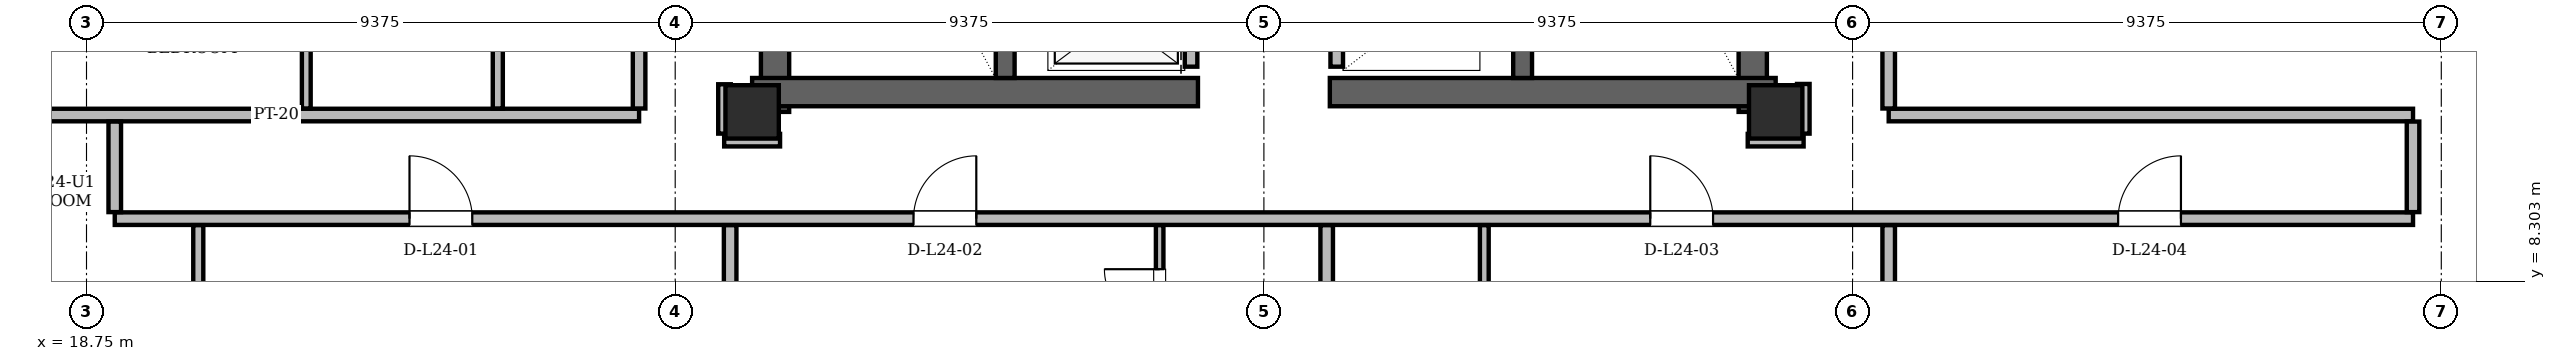
"""IFC4 building model, lengths in metres.
Left out: names, types, materials, properties, quantities, classifications, styles, units other than length and angle.
Written with IfcOpenShell. Run it as: python <this file> out.ifc"""

import sys

from ifc_helpers import new_model, si_unit, direction, frame, frame_2d, origin, origin_2d, place, context, subcontext, project, spatial, rectangle, hollow_rectangle, extrude, element, fill, save


model = new_model("IFC4")
c1 = context("Model", 3, precision=1e-05, world=origin(), true_north=direction((0.0, 1.0)))
c2 = subcontext(c1, "Body", "Model", "MODEL_VIEW")
j1 = project(units=[si_unit("LENGTHUNIT", "METRE"), si_unit("PLANEANGLEUNIT", "RADIAN")], contexts=[c1])
p1 = place(None, origin())
s1 = spatial("IfcSite", under=j1, at=p1, CompositionType="ELEMENT")
p2 = place(p1, origin())
s2 = spatial("IfcBuilding", under=s1, at=p2, CompositionType="ELEMENT")
p3 = place(p2, frame((0.0, 0.0, 93.3)))
s3 = spatial("IfcBuildingStorey", under=s2, at=p3, CompositionType="ELEMENT", Elevation=93.3)
for number, where, z_axis, x_axis in (
    (1, (29.35, 11.0, 0.0), (0.0, 0.0, 1.0), (1.0, 0.0, 0.0)),
    (2, (45.65, 11.0, 0.0), (0.0, 0.0, 1.0), (1.0, 0.0, 0.0)),
):
    element("IfcColumn", number, at=place(p3, frame(where, z_axis=z_axis, x_axis=x_axis)), inside=s3, PredefinedType="COLUMN", context=c2, shape_type="SweptSolid", body=[
        extrude(hollow_rectangle(XDim=0.85, YDim=0.85, WallThickness=0.07, at=origin_2d()), origin(), (0.0, 0.0, 1.0), 3.6),
    ])
for number, where, z_axis, x_axis in (
    (3, (29.715, 11.0, 0.0), (0.0, 0.0, 1.0), (0.0, 1.0, 0.0)),
    (4, (45.285, 11.0, 0.0), (0.0, 0.0, 1.0), (0.0, 1.0, 0.0)),
):
    element("IfcWall", number, at=place(p3, frame(where, z_axis=z_axis, x_axis=x_axis)), inside=s3, PredefinedType="SHEAR", context=c2, shape_type="SweptSolid", body=[
        extrude(rectangle(XDim=13.3, YDim=0.45, at=frame_2d((6.65, 0.0))), origin(), (0.0, 0.0, 1.0), 3.36),
    ])
for number, where, z_axis, x_axis in (
    (5, (29.35, 11.315, 0.0), (0.0, 0.0, 1.0), (1.0, 0.0, 0.0)),
    (6, (38.55, 11.315, 0.0), (0.0, 0.0, 1.0), (1.0, 0.0, 0.0)),
):
    element("IfcWall", number, at=place(p3, frame(where, z_axis=z_axis, x_axis=x_axis)), inside=s3, PredefinedType="SHEAR", context=c2, shape_type="SweptSolid", body=[
        extrude(rectangle(XDim=7.1, YDim=0.45, at=frame_2d((3.55, 0.0))), origin(), (0.0, 0.0, 1.0), 3.36),
    ])
for number, where, z_axis, x_axis in (
    (7, (33.38, 11.54, 0.0), (0.0, 0.0, 1.0), (0.0, 1.0, 0.0)),
    (8, (41.62, 11.54, 0.0), (0.0, 0.0, 1.0), (0.0, 1.0, 0.0)),
):
    element("IfcWall", number, at=place(p3, frame(where, z_axis=z_axis, x_axis=x_axis)), inside=s3, PredefinedType="SHEAR", context=c2, shape_type="SweptSolid", body=[
        extrude(rectangle(XDim=7.62, YDim=0.3, at=frame_2d((3.81, 0.0))), origin(), (0.0, 0.0, 1.0), 3.36),
    ])
p4 = place(p3, frame((14.197, 13.718, 0.0), z_axis=(0.0, 0.0, 1.0), x_axis=(0.500008273126, -0.86602062724, 0.0)))
e9 = element("IfcWall", 9, at=p4, inside=s3, PredefinedType="SOLIDWALL", context=c2, shape_type="SweptSolid", body=[
    extrude(rectangle(XDim=12.249, YDim=0.34, at=frame_2d((6.125, 0.0))), origin(), (0.0, 0.0, 1.0), 2.578),
])
p5 = place(p4, frame((0.852, 0.0, 1.28)))
e10 = element("IfcOpeningElement", 10, at=p5, cuts=e9, PredefinedType="OPENING", context=c2, shape_type="SweptSolid", body=[
    extrude(rectangle(XDim=0.85, YDim=0.92, at=frame_2d((0.425, 0.46))), frame((0.0, 0.17, 0.0), z_axis=(0.0, -1.0, 0.0), x_axis=(1.0, 0.0, 0.0)), (0.0, 0.0, 1.0), 0.34),
])
p6 = place(p3, frame((54.678, 3.11, 0.0), z_axis=(0.0, 0.0, 1.0), x_axis=(0.500008273126, 0.86602062724, 0.0)))
e11 = element("IfcWall", 11, at=p6, inside=s3, PredefinedType="SOLIDWALL", context=c2, shape_type="SweptSolid", body=[
    extrude(rectangle(XDim=12.249, YDim=0.34, at=frame_2d((6.125, 0.0))), origin(), (0.0, 0.0, 1.0), 2.578),
])
p7 = place(p3, frame((36.34, 11.72, 0.0), z_axis=(0.0, 0.0, 1.0), x_axis=(0.0, 1.0, 0.0)))
e12 = element("IfcWall", 12, at=p7, inside=s3, PredefinedType="PARTITIONING", context=c2, shape_type="SweptSolid", body=[
    extrude(rectangle(XDim=7.6, YDim=0.2, at=frame_2d((3.8, 0.0))), origin(), (0.0, 0.0, 1.0), 3.36),
])
p8 = place(p7, frame((0.255, 0.0, 0.0)))
e13 = element("IfcOpeningElement", 13, at=p8, cuts=e12, PredefinedType="OPENING", context=c2, shape_type="SweptSolid", body=[
    extrude(rectangle(XDim=1.05, YDim=2.15, at=frame_2d((0.525, 1.075))), frame((0.0, 0.1, 0.0), z_axis=(0.0, -1.0, 0.0), x_axis=(1.0, 0.0, 0.0)), (0.0, 0.0, 1.0), 0.2),
])
p9 = place(p7, frame((2.105, 0.0, 0.0)))
e14 = element("IfcOpeningElement", 14, at=p9, cuts=e12, PredefinedType="OPENING", context=c2, shape_type="SweptSolid", body=[
    extrude(rectangle(XDim=1.05, YDim=2.15, at=frame_2d((0.525, 1.075))), frame((0.0, 0.1, 0.0), z_axis=(0.0, -1.0, 0.0), x_axis=(1.0, 0.0, 0.0)), (0.0, 0.0, 1.0), 0.2),
])
p10 = place(p7, frame((3.955, 0.0, 0.0)))
e15 = element("IfcOpeningElement", 15, at=p10, cuts=e12, PredefinedType="OPENING", context=c2, shape_type="SweptSolid", body=[
    extrude(rectangle(XDim=1.05, YDim=2.15, at=frame_2d((0.525, 1.075))), frame((0.0, 0.1, 0.0), z_axis=(0.0, -1.0, 0.0), x_axis=(1.0, 0.0, 0.0)), (0.0, 0.0, 1.0), 0.2),
])
p11 = place(p3, frame((38.66, 11.72, 0.0), z_axis=(0.0, 0.0, 1.0), x_axis=(0.0, 1.0, 0.0)))
e16 = element("IfcWall", 16, at=p11, inside=s3, PredefinedType="PARTITIONING", context=c2, shape_type="SweptSolid", body=[
    extrude(rectangle(XDim=9.1, YDim=0.2, at=frame_2d((4.55, 0.0))), origin(), (0.0, 0.0, 1.0), 3.36),
])
p12 = place(p3, frame((19.2, 9.3, 0.0), z_axis=(0.0, 0.0, 1.0), x_axis=(1.0, 0.0, 0.0)))
e17 = element("IfcWall", 17, at=p12, inside=s3, PredefinedType="PARTITIONING", context=c2, shape_type="SweptSolid", body=[
    extrude(rectangle(XDim=36.6, YDim=0.2, at=frame_2d((18.3, 0.0))), origin(), (0.0, 0.0, 1.0), 2.814),
])
p13 = place(p12, frame((4.694, 0.0, 0.0)))
e18 = element("IfcOpeningElement", 18, at=p13, cuts=e17, PredefinedType="OPENING", context=c2, shape_type="SweptSolid", body=[
    extrude(rectangle(XDim=1.0, YDim=2.18, at=frame_2d((0.5, 1.09))), frame((0.0, 0.1, 0.0), z_axis=(0.0, -1.0, 0.0), x_axis=(1.0, 0.0, 0.0)), (0.0, 0.0, 1.0), 0.2),
])
p14 = place(p12, frame((12.72, 0.0, 0.0)))
e19 = element("IfcOpeningElement", 19, at=p14, cuts=e17, PredefinedType="OPENING", context=c2, shape_type="SweptSolid", body=[
    extrude(rectangle(XDim=1.0, YDim=2.18, at=frame_2d((0.5, 1.09))), frame((0.0, 0.1, 0.0), z_axis=(0.0, -1.0, 0.0), x_axis=(1.0, 0.0, 0.0)), (0.0, 0.0, 1.0), 0.2),
])
p15 = place(p12, frame((24.453, 0.0, 0.0)))
e20 = element("IfcOpeningElement", 20, at=p15, cuts=e17, PredefinedType="OPENING", context=c2, shape_type="SweptSolid", body=[
    extrude(rectangle(XDim=1.0, YDim=2.18, at=frame_2d((0.5, 1.09))), frame((0.0, 0.1, 0.0), z_axis=(0.0, -1.0, 0.0), x_axis=(1.0, 0.0, 0.0)), (0.0, 0.0, 1.0), 0.2),
])
p16 = place(p12, frame((31.904, 0.0, 0.0)))
e21 = element("IfcOpeningElement", 21, at=p16, cuts=e17, PredefinedType="OPENING", context=c2, shape_type="SweptSolid", body=[
    extrude(rectangle(XDim=1.0, YDim=2.18, at=frame_2d((0.5, 1.09))), frame((0.0, 0.1, 0.0), z_axis=(0.0, -1.0, 0.0), x_axis=(1.0, 0.0, 0.0)), (0.0, 0.0, 1.0), 0.2),
])
for number, where, z_axis, x_axis in (
    (22, (28.905, 10.55, 0.0), (0.0, 0.0, 1.0), (1.0, 0.0, 0.0)),
    (23, (45.205, 10.55, 0.0), (0.0, 0.0, 1.0), (1.0, 0.0, 0.0)),
):
    element("IfcWall", number, at=place(p3, frame(where, z_axis=z_axis, x_axis=x_axis)), inside=s3, PredefinedType="PARTITIONING", context=c2, shape_type="SweptSolid", body=[
        extrude(rectangle(XDim=0.89, YDim=0.2, at=frame_2d((0.445, 0.0))), origin(), (0.0, 0.0, 1.0), 3.36),
    ])
p17 = place(p3, frame((15.996, 10.95, 0.0), z_axis=(0.0, 0.0, 1.0), x_axis=(1.0, 0.0, 0.0)))
e24 = element("IfcWall", 24, at=p17, inside=s3, PredefinedType="PARTITIONING", context=c2, shape_type="SweptSolid", body=[
    extrude(rectangle(XDim=11.554, YDim=0.2, at=frame_2d((5.777, 0.0))), origin(), (0.0, 0.0, 1.0), 3.36),
])
p18 = place(p3, frame((47.45, 10.95, 0.0), z_axis=(0.0, 0.0, 1.0), x_axis=(1.0, 0.0, 0.0)))
e25 = element("IfcWall", 25, at=p18, inside=s3, PredefinedType="PARTITIONING", context=c2, shape_type="SweptSolid", body=[
    extrude(rectangle(XDim=8.35, YDim=0.2, at=frame_2d((4.175, 0.0))), origin(), (0.0, 0.0, 1.0), 3.36),
])
p19 = place(p3, frame((19.2, 9.404, 0.0), z_axis=(0.0, 0.0, 1.0), x_axis=(0.0, 1.0, 0.0)))
e26 = element("IfcWall", 26, at=p19, inside=s3, PredefinedType="PARTITIONING", context=c2, shape_type="SweptSolid", body=[
    extrude(rectangle(XDim=1.442, YDim=0.2, at=frame_2d((0.721, 0.0))), origin(), (0.0, 0.0, 1.0), 3.36),
])
p20 = place(p3, frame((20.53, 3.519, 0.0), z_axis=(0.0, 0.0, 1.0), x_axis=(0.0, 1.0, 0.0)))
e27 = element("IfcWall", 27, at=p20, inside=s3, PredefinedType="PARTITIONING", context=c2, shape_type="SweptSolid", body=[
    extrude(rectangle(XDim=5.677, YDim=0.16, at=frame_2d((2.838, 0.0))), origin(), (0.0, 0.0, 1.0), 3.36),
])
p21 = place(p20, frame((2.321, 0.0, 0.0)))
e28 = element("IfcOpeningElement", 28, at=p21, cuts=e27, PredefinedType="OPENING", context=c2, shape_type="SweptSolid", body=[
    extrude(rectangle(XDim=0.88, YDim=2.08, at=frame_2d((0.44, 1.04))), frame((0.0, 0.08, 0.0), z_axis=(0.0, -1.0, 0.0), x_axis=(1.0, 0.0, 0.0)), (0.0, 0.0, 1.0), 0.16),
])
p22 = place(p3, frame((22.25, 11.054, 0.0), z_axis=(0.0, 0.0, 1.0), x_axis=(0.0, 1.0, 0.0)))
e29 = element("IfcWall", 29, at=p22, inside=s3, PredefinedType="PARTITIONING", context=c2, shape_type="SweptSolid", body=[
    extrude(rectangle(XDim=2.482, YDim=0.14, at=frame_2d((1.241, 0.0))), origin(), (0.0, 0.0, 1.0), 2.814),
])
p23 = place(p3, frame((25.3, 11.054, 0.0), z_axis=(0.0, 0.0, 1.0), x_axis=(0.0, 1.0, 0.0)))
e30 = element("IfcWall", 30, at=p23, inside=s3, PredefinedType="PARTITIONING", context=c2, shape_type="SweptSolid", body=[
    extrude(rectangle(XDim=2.482, YDim=0.16, at=frame_2d((1.241, 0.0))), origin(), (0.0, 0.0, 1.0), 2.814),
])
p24 = place(p3, frame((27.55, 11.054, 0.0), z_axis=(0.0, 0.0, 1.0), x_axis=(0.0, 1.0, 0.0)))
e31 = element("IfcWall", 31, at=p24, inside=s3, PredefinedType="PARTITIONING", context=c2, shape_type="SweptSolid", body=[
    extrude(rectangle(XDim=14.812, YDim=0.2, at=frame_2d((7.406, 0.0))), origin(), (0.0, 0.0, 1.0), 2.814),
])
p25 = place(p24, frame((3.825, 0.0, 0.0)))
e32 = element("IfcOpeningElement", 32, at=p25, cuts=e31, PredefinedType="OPENING", context=c2, shape_type="SweptSolid", body=[
    extrude(rectangle(XDim=1.0, YDim=2.18, at=frame_2d((0.5, 1.09))), frame((0.0, 0.1, 0.0), z_axis=(0.0, -1.0, 0.0), x_axis=(1.0, 0.0, 0.0)), (0.0, 0.0, 1.0), 0.2),
])
p26 = place(p24, frame((10.328, 0.0, 0.0)))
e33 = element("IfcOpeningElement", 33, at=p26, cuts=e31, PredefinedType="OPENING", context=c2, shape_type="SweptSolid", body=[
    extrude(rectangle(XDim=1.0, YDim=2.18, at=frame_2d((0.5, 1.09))), frame((0.0, 0.1, 0.0), z_axis=(0.0, -1.0, 0.0), x_axis=(1.0, 0.0, 0.0)), (0.0, 0.0, 1.0), 0.2),
])
p27 = place(p3, frame((28.91, 10.654, 0.0), z_axis=(0.0, 0.0, 1.0), x_axis=(0.0, 1.0, 0.0)))
e34 = element("IfcWall", 34, at=p27, inside=s3, PredefinedType="PARTITIONING", context=c2, shape_type="SweptSolid", body=[
    extrude(rectangle(XDim=0.786, YDim=0.2, at=frame_2d((0.393, 0.0))), origin(), (0.0, 0.0, 1.0), 2.814),
])
p28 = place(p3, frame((29.0, 3.284, 0.0), z_axis=(0.0, 0.0, 1.0), x_axis=(0.0, 1.0, 0.0)))
e35 = element("IfcWall", 35, at=p28, inside=s3, PredefinedType="PARTITIONING", context=c2, shape_type="SweptSolid", body=[
    extrude(rectangle(XDim=5.912, YDim=0.2, at=frame_2d((2.956, 0.0))), origin(), (0.0, 0.0, 1.0), 2.946),
])
p29 = place(p3, frame((35.84, 3.204, 0.0), z_axis=(0.0, 0.0, 1.0), x_axis=(0.0, 1.0, 0.0)))
e36 = element("IfcWall", 36, at=p29, inside=s3, PredefinedType="PARTITIONING", context=c2, shape_type="SweptSolid", body=[
    extrude(rectangle(XDim=5.992, YDim=0.12, at=frame_2d((2.996, 0.0))), origin(), (0.0, 0.0, 1.0), 3.36),
])
p30 = place(p29, frame((1.326, 0.0, 0.0)))
e37 = element("IfcOpeningElement", 37, at=p30, cuts=e36, PredefinedType="OPENING", context=c2, shape_type="SweptSolid", body=[
    extrude(rectangle(XDim=0.95, YDim=2.1, at=frame_2d((0.475, 1.05))), frame((0.0, 0.06, 0.0), z_axis=(0.0, -1.0, 0.0), x_axis=(1.0, 0.0, 0.0)), (0.0, 0.0, 1.0), 0.12),
])
p31 = place(p29, frame((4.411, 0.0, 0.0)))
e38 = element("IfcOpeningElement", 38, at=p31, cuts=e36, PredefinedType="OPENING", context=c2, shape_type="SweptSolid", body=[
    extrude(rectangle(XDim=0.88, YDim=2.08, at=frame_2d((0.44, 1.04))), frame((0.0, 0.06, 0.0), z_axis=(0.0, -1.0, 0.0), x_axis=(1.0, 0.0, 0.0)), (0.0, 0.0, 1.0), 0.12),
])
p32 = place(p3, frame((38.5, 3.204, 0.0), z_axis=(0.0, 0.0, 1.0), x_axis=(0.0, 1.0, 0.0)))
e39 = element("IfcWall", 39, at=p32, inside=s3, PredefinedType="PARTITIONING", context=c2, shape_type="SweptSolid", body=[
    extrude(rectangle(XDim=5.992, YDim=0.2, at=frame_2d((2.996, 0.0))), origin(), (0.0, 0.0, 1.0), 2.578),
])
p33 = place(p3, frame((41.01, 3.284, 0.0), z_axis=(0.0, 0.0, 1.0), x_axis=(0.0, 1.0, 0.0)))
e40 = element("IfcWall", 40, at=p33, inside=s3, PredefinedType="PARTITIONING", context=c2, shape_type="SweptSolid", body=[
    extrude(rectangle(XDim=5.912, YDim=0.14, at=frame_2d((2.956, 0.0))), origin(), (0.0, 0.0, 1.0), 3.36),
])
p34 = place(p33, frame((2.556, 0.0, 0.0)))
e41 = element("IfcOpeningElement", 41, at=p34, cuts=e40, PredefinedType="OPENING", context=c2, shape_type="SweptSolid", body=[
    extrude(rectangle(XDim=0.88, YDim=2.08, at=frame_2d((0.44, 1.04))), frame((0.0, 0.07, 0.0), z_axis=(0.0, -1.0, 0.0), x_axis=(1.0, 0.0, 0.0)), (0.0, 0.0, 1.0), 0.14),
])
p35 = place(p3, frame((46.09, 10.654, 0.0), z_axis=(0.0, 0.0, 1.0), x_axis=(0.0, 1.0, 0.0)))
e42 = element("IfcWall", 42, at=p35, inside=s3, PredefinedType="PARTITIONING", context=c2, shape_type="SweptSolid", body=[
    extrude(rectangle(XDim=0.791, YDim=0.2, at=frame_2d((0.396, 0.0))), origin(), (0.0, 0.0, 1.0), 2.814),
])
p36 = place(p3, frame((47.45, 3.284, 0.0), z_axis=(0.0, 0.0, 1.0), x_axis=(0.0, 1.0, 0.0)))
e43 = element("IfcWall", 43, at=p36, inside=s3, PredefinedType="PARTITIONING", context=c2, shape_type="SweptSolid", body=[
    extrude(rectangle(XDim=5.912, YDim=0.2, at=frame_2d((2.956, 0.0))), origin(), (0.0, 0.0, 1.0), 2.946),
])
p37 = place(p3, frame((47.45, 11.054, 0.0), z_axis=(0.0, 0.0, 1.0), x_axis=(0.0, 1.0, 0.0)))
e44 = element("IfcWall", 44, at=p37, inside=s3, PredefinedType="PARTITIONING", context=c2, shape_type="SweptSolid", body=[
    extrude(rectangle(XDim=25.444, YDim=0.2, at=frame_2d((12.722, 0.0))), origin(), (0.0, 0.0, 1.0), 2.578),
])
p38 = place(p37, frame((10.335, 0.0, 0.0)))
e45 = element("IfcOpeningElement", 45, at=p38, cuts=e44, PredefinedType="OPENING", context=c2, shape_type="SweptSolid", body=[
    extrude(rectangle(XDim=1.0, YDim=2.18, at=frame_2d((0.5, 1.09))), frame((0.0, 0.1, 0.0), z_axis=(0.0, -1.0, 0.0), x_axis=(1.0, 0.0, 0.0)), (0.0, 0.0, 1.0), 0.2),
])
p39 = place(p3, frame((55.8, 9.404, 0.0), z_axis=(0.0, 0.0, 1.0), x_axis=(0.0, 1.0, 0.0)))
e46 = element("IfcWall", 46, at=p39, inside=s3, PredefinedType="PARTITIONING", context=c2, shape_type="SweptSolid", body=[
    extrude(rectangle(XDim=1.442, YDim=0.2, at=frame_2d((0.721, 0.0))), origin(), (0.0, 0.0, 1.0), 3.36),
])
p40 = place(p13, origin())
e47 = element("IfcDoor", 47, at=p40, inside=s3, OperationType="SINGLE_SWING_LEFT", PredefinedType="DOOR", context=c2, shape_type="SweptSolid", body=[
    extrude(rectangle(XDim=1.0, YDim=2.18, at=frame_2d((0.5, 1.09))), frame((0.0, 0.025, 0.0), z_axis=(0.0, -1.0, 0.0), x_axis=(1.0, 0.0, 0.0)), (0.0, 0.0, 1.0), 0.05),
])
fill(e18, e47)
p41 = place(p14, origin())
e48 = element("IfcDoor", 48, at=p41, inside=s3, OperationType="SINGLE_SWING_RIGHT", PredefinedType="DOOR", context=c2, shape_type="SweptSolid", body=[
    extrude(rectangle(XDim=1.0, YDim=2.18, at=frame_2d((0.5, 1.09))), frame((0.0, 0.025, 0.0), z_axis=(0.0, -1.0, 0.0), x_axis=(1.0, 0.0, 0.0)), (0.0, 0.0, 1.0), 0.05),
])
fill(e19, e48)
p42 = place(p15, origin())
e49 = element("IfcDoor", 49, at=p42, inside=s3, OperationType="SINGLE_SWING_LEFT", PredefinedType="DOOR", context=c2, shape_type="SweptSolid", body=[
    extrude(rectangle(XDim=1.0, YDim=2.18, at=frame_2d((0.5, 1.09))), frame((0.0, 0.025, 0.0), z_axis=(0.0, -1.0, 0.0), x_axis=(1.0, 0.0, 0.0)), (0.0, 0.0, 1.0), 0.05),
])
fill(e20, e49)
p43 = place(p16, origin())
e50 = element("IfcDoor", 50, at=p43, inside=s3, OperationType="SINGLE_SWING_RIGHT", PredefinedType="DOOR", context=c2, shape_type="SweptSolid", body=[
    extrude(rectangle(XDim=1.0, YDim=2.18, at=frame_2d((0.5, 1.09))), frame((0.0, 0.025, 0.0), z_axis=(0.0, -1.0, 0.0), x_axis=(1.0, 0.0, 0.0)), (0.0, 0.0, 1.0), 0.05),
])
fill(e21, e50)
p44 = place(p31, origin())
e51 = element("IfcDoor", 51, at=p44, inside=s3, OperationType="SINGLE_SWING_RIGHT", PredefinedType="DOOR", context=c2, shape_type="SweptSolid", body=[
    extrude(rectangle(XDim=0.88, YDim=2.08, at=frame_2d((0.44, 1.04))), frame((0.0, 0.025, 0.0), z_axis=(0.0, -1.0, 0.0), x_axis=(1.0, 0.0, 0.0)), (0.0, 0.0, 1.0), 0.05),
])
fill(e38, e51)
save(model, sys.argv[1])
